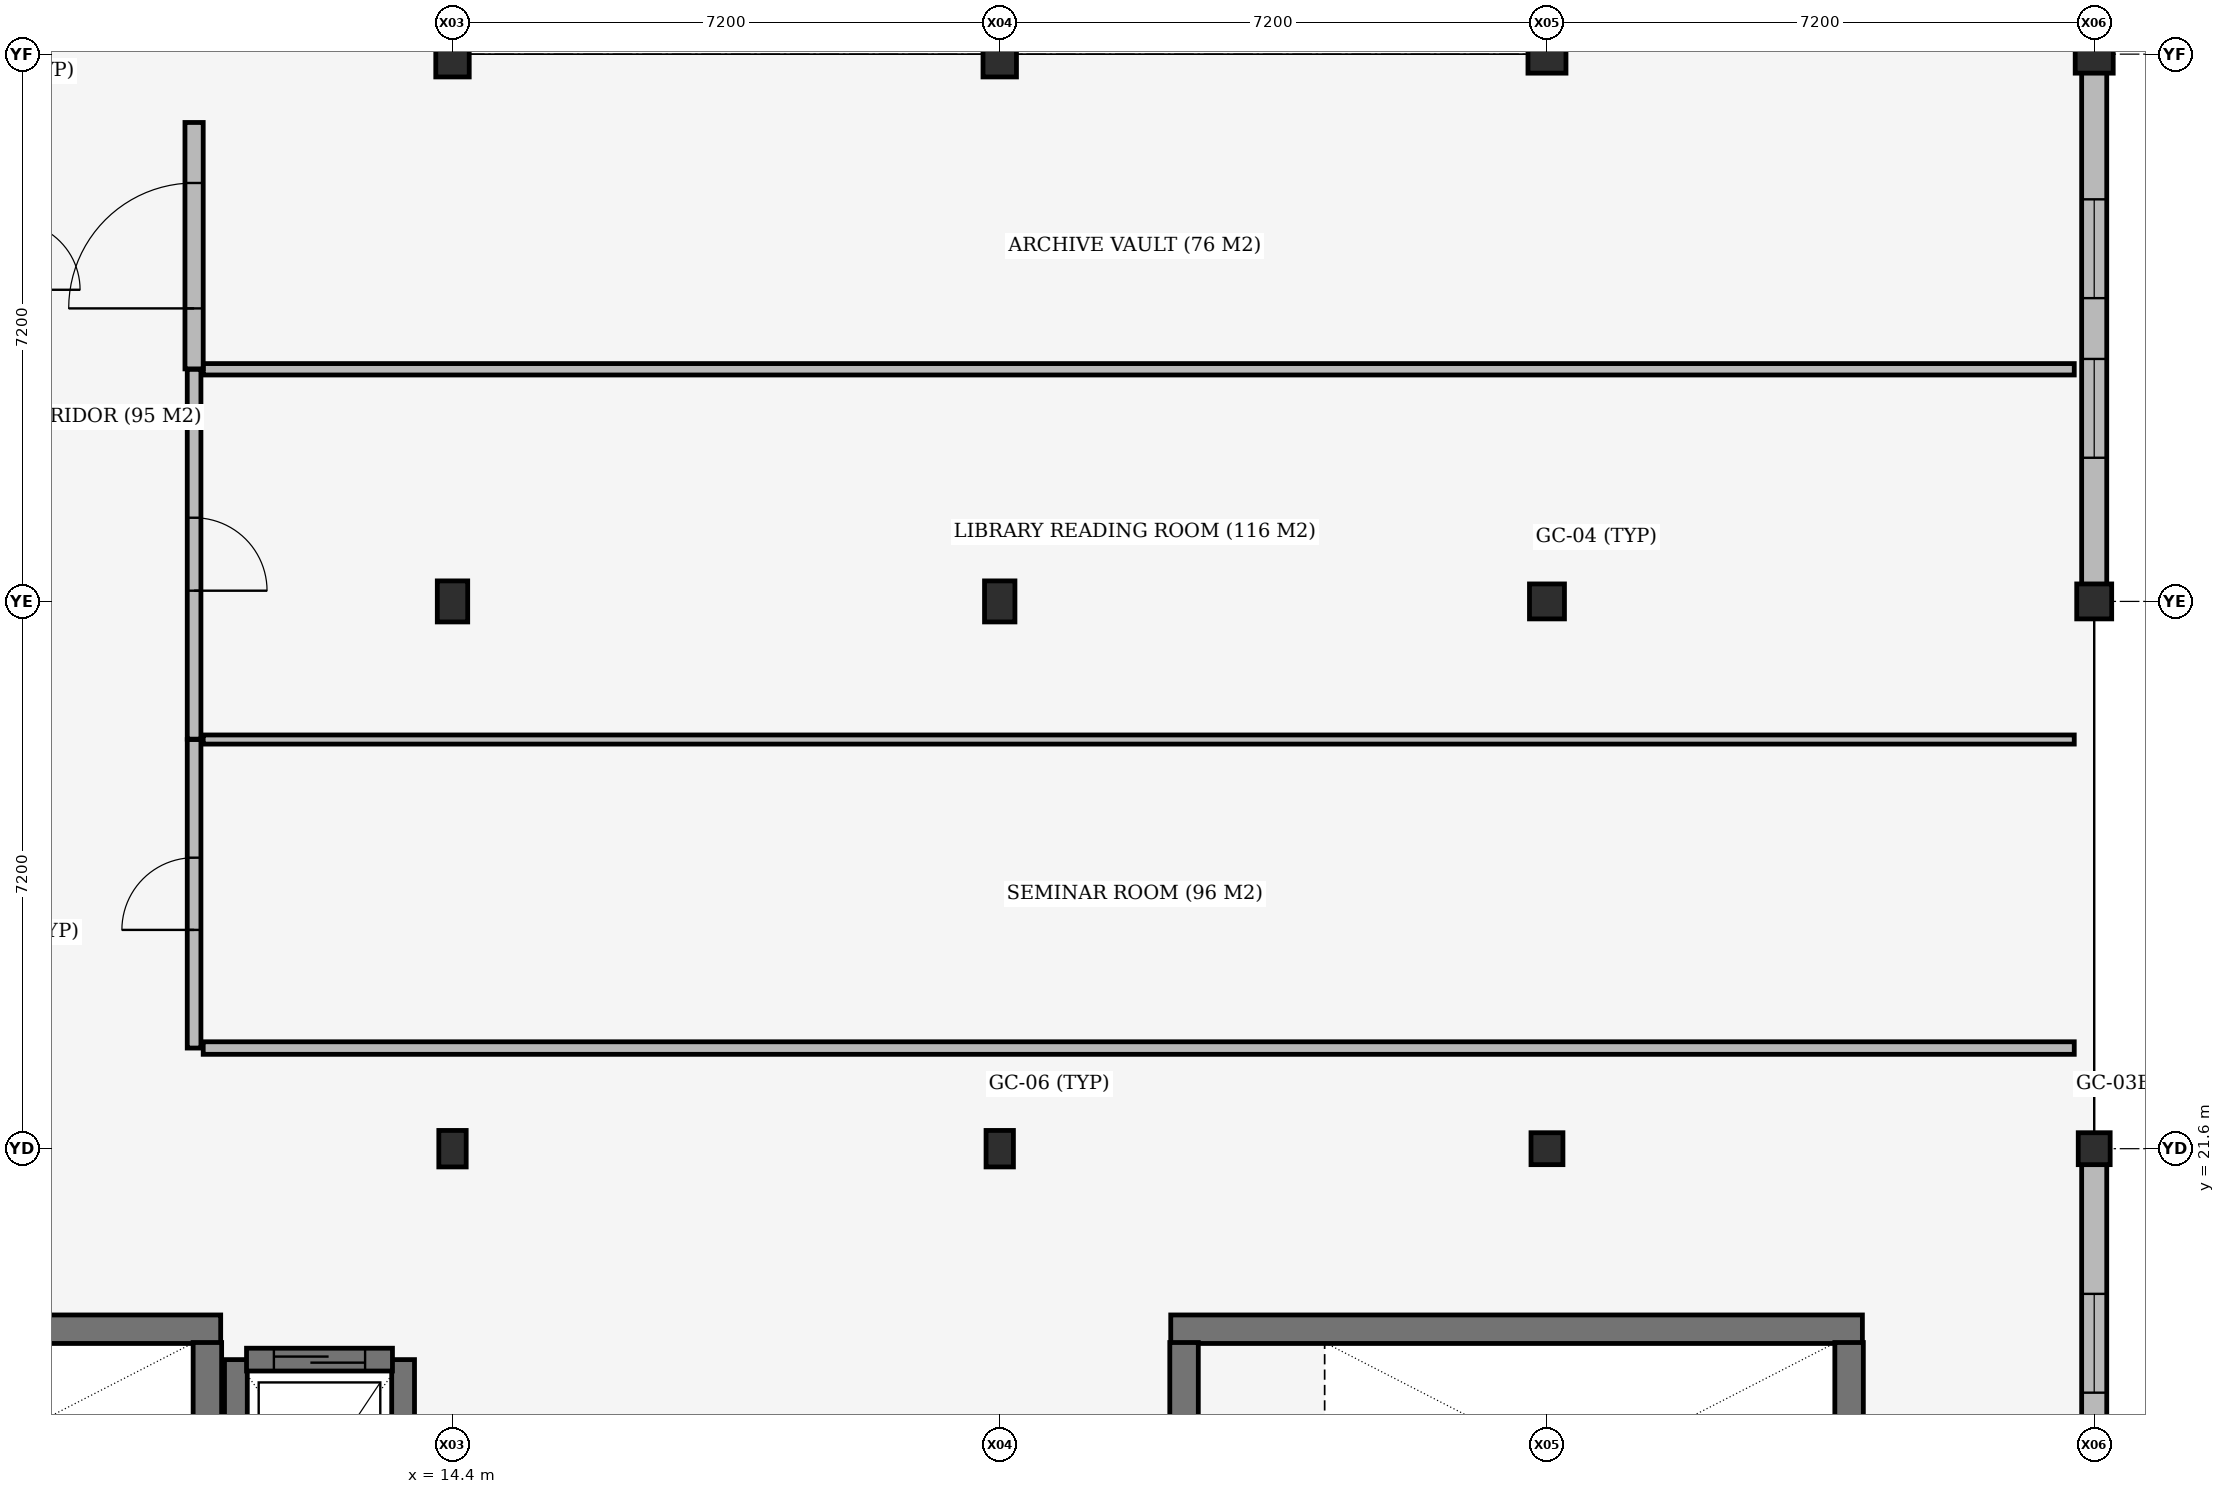
"""IFC4 building model, lengths in metres.
Left out: names, types, materials, properties, quantities, classifications, styles, units other than length and angle.
Written with IfcOpenShell. Run it as: python <this file> out.ifc"""

import sys

from ifc_helpers import new_model, si_unit, direction, frame, frame_2d, origin, origin_2d, place, context, subcontext, project, spatial, rectangle, extrude, element, fill, save


model = new_model("IFC4")
c1 = context("Model", 3, precision=1e-05, world=origin(), true_north=direction((0.0, 1.0)))
c2 = subcontext(c1, "Body", "Model", "MODEL_VIEW")
j1 = project(units=[si_unit("LENGTHUNIT", "METRE"), si_unit("PLANEANGLEUNIT", "RADIAN")], contexts=[c1])
p1 = place(None, origin())
s1 = spatial("IfcSite", under=j1, at=p1, CompositionType="ELEMENT")
p2 = place(p1, origin())
s2 = spatial("IfcBuilding", under=s1, at=p2, CompositionType="ELEMENT")
p3 = place(p2, frame((0.0, 0.0, 22.2)))
s3 = spatial("IfcBuildingStorey", under=s2, at=p3, CompositionType="ELEMENT", Elevation=22.2)
p4 = place(p3, frame((14.4, 21.6, 0.0), z_axis=(0.0, 0.0, 1.0), x_axis=(1.0, 0.0, 0.0)))
e1 = element("IfcColumn", 1, at=p4, inside=s3, PredefinedType="COLUMN", context=c2, shape_type="SweptSolid", body=[
    extrude(rectangle(XDim=0.36, YDim=0.48, at=origin_2d()), origin(), (0.0, 0.0, 1.0), 3.96),
])
p5 = place(p3, frame((14.4, 28.8, 0.0), z_axis=(0.0, 0.0, 1.0), x_axis=(1.0, 0.0, 0.0)))
e2 = element("IfcColumn", 2, at=p5, inside=s3, PredefinedType="COLUMN", context=c2, shape_type="SweptSolid", body=[
    extrude(rectangle(XDim=0.4, YDim=0.54, at=origin_2d()), origin(), (0.0, 0.0, 1.0), 3.96),
])
p6 = place(p3, frame((14.4, 36.0, 0.0), z_axis=(0.0, 0.0, 1.0), x_axis=(1.0, 0.0, 0.0)))
e3 = element("IfcColumn", 3, at=p6, inside=s3, PredefinedType="COLUMN", context=c2, shape_type="SweptSolid", body=[
    extrude(rectangle(XDim=0.44, YDim=0.6, at=origin_2d()), origin(), (0.0, 0.0, 1.0), 3.96),
])
p7 = place(p3, frame((21.6, 21.6, 0.0), z_axis=(0.0, 0.0, 1.0), x_axis=(1.0, 0.0, 0.0)))
e4 = element("IfcColumn", 4, at=p7, inside=s3, PredefinedType="COLUMN", context=c2, shape_type="SweptSolid", body=[
    extrude(rectangle(XDim=0.36, YDim=0.48, at=origin_2d()), origin(), (0.0, 0.0, 1.0), 3.96),
])
p8 = place(p3, frame((21.6, 28.8, 0.0), z_axis=(0.0, 0.0, 1.0), x_axis=(1.0, 0.0, 0.0)))
e5 = element("IfcColumn", 5, at=p8, inside=s3, PredefinedType="COLUMN", context=c2, shape_type="SweptSolid", body=[
    extrude(rectangle(XDim=0.4, YDim=0.54, at=origin_2d()), origin(), (0.0, 0.0, 1.0), 3.96),
])
p9 = place(p3, frame((21.6, 36.0, 0.0), z_axis=(0.0, 0.0, 1.0), x_axis=(1.0, 0.0, 0.0)))
e6 = element("IfcColumn", 6, at=p9, inside=s3, PredefinedType="COLUMN", context=c2, shape_type="SweptSolid", body=[
    extrude(rectangle(XDim=0.44, YDim=0.6, at=origin_2d()), origin(), (0.0, 0.0, 1.0), 3.96),
])
p10 = place(p3, frame((28.8, 21.6, 0.0), z_axis=(0.0, 0.0, 1.0), x_axis=(1.0, 0.0, 0.0)))
e7 = element("IfcColumn", 7, at=p10, inside=s3, PredefinedType="COLUMN", context=c2, shape_type="SweptSolid", body=[
    extrude(rectangle(XDim=0.42, YDim=0.42, at=origin_2d()), origin(), (0.0, 0.0, 1.0), 3.96),
])
p11 = place(p3, frame((28.8, 28.8, 0.0), z_axis=(0.0, 0.0, 1.0), x_axis=(1.0, 0.0, 0.0)))
e8 = element("IfcColumn", 8, at=p11, inside=s3, PredefinedType="COLUMN", context=c2, shape_type="SweptSolid", body=[
    extrude(rectangle(XDim=0.46, YDim=0.46, at=origin_2d()), origin(), (0.0, 0.0, 1.0), 3.96),
])
p12 = place(p3, frame((28.8, 36.0, 0.0), z_axis=(0.0, 0.0, 1.0), x_axis=(1.0, 0.0, 0.0)))
e9 = element("IfcColumn", 9, at=p12, inside=s3, PredefinedType="COLUMN", context=c2, shape_type="SweptSolid", body=[
    extrude(rectangle(XDim=0.5, YDim=0.5, at=origin_2d()), origin(), (0.0, 0.0, 1.0), 3.96),
])
p13 = place(p3, frame((36.0, 21.6, 0.0), z_axis=(0.0, 0.0, 1.0), x_axis=(1.0, 0.0, 0.0)))
e10 = element("IfcColumn", 10, at=p13, inside=s3, PredefinedType="COLUMN", context=c2, shape_type="SweptSolid", body=[
    extrude(rectangle(XDim=0.42, YDim=0.42, at=origin_2d()), origin(), (0.0, 0.0, 1.0), 3.96),
])
p14 = place(p3, frame((36.0, 28.8, 0.0), z_axis=(0.0, 0.0, 1.0), x_axis=(1.0, 0.0, 0.0)))
e11 = element("IfcColumn", 11, at=p14, inside=s3, PredefinedType="COLUMN", context=c2, shape_type="SweptSolid", body=[
    extrude(rectangle(XDim=0.46, YDim=0.46, at=origin_2d()), origin(), (0.0, 0.0, 1.0), 3.96),
])
p15 = place(p3, frame((36.0, 36.0, 0.0), z_axis=(0.0, 0.0, 1.0), x_axis=(1.0, 0.0, 0.0)))
e12 = element("IfcColumn", 12, at=p15, inside=s3, PredefinedType="COLUMN", context=c2, shape_type="SweptSolid", body=[
    extrude(rectangle(XDim=0.5, YDim=0.5, at=origin_2d()), origin(), (0.0, 0.0, 1.0), 3.96),
])
p16 = place(p3, frame((11.35, 19.225, 0.0), z_axis=(0.0, 0.0, 1.0), x_axis=(-1.0, 0.0, 0.0)))
e13 = element("IfcWall", 13, at=p16, inside=s3, PredefinedType="SHEAR", context=c2, shape_type="SweptSolid", body=[
    extrude(rectangle(XDim=9.1, YDim=0.375, at=frame_2d((4.55, 0.0))), origin(), (0.0, 0.0, 1.0), 3.96),
])
p17 = place(p3, frame((11.175, 15.6, 0.0), z_axis=(0.0, 0.0, 1.0), x_axis=(0.0, 1.0, 0.0)))
e14 = element("IfcWall", 14, at=p17, inside=s3, PredefinedType="SHEAR", context=c2, shape_type="SweptSolid", body=[
    extrude(rectangle(XDim=3.45, YDim=0.375, at=frame_2d((1.725, 0.0))), origin(), (0.0, 0.0, 1.0), 3.96),
])
p18 = place(p3, frame((32.95, 19.225, 0.0), z_axis=(0.0, 0.0, 1.0), x_axis=(-1.0, 0.0, 0.0)))
e15 = element("IfcWall", 15, at=p18, inside=s3, PredefinedType="SHEAR", context=c2, shape_type="SweptSolid", body=[
    extrude(rectangle(XDim=9.1, YDim=0.375, at=frame_2d((4.55, 0.0))), origin(), (0.0, 0.0, 1.0), 3.96),
])
p19 = place(p3, frame((32.775, 15.6, 0.0), z_axis=(0.0, 0.0, 1.0), x_axis=(0.0, 1.0, 0.0)))
e16 = element("IfcWall", 16, at=p19, inside=s3, PredefinedType="SHEAR", context=c2, shape_type="SweptSolid", body=[
    extrude(rectangle(XDim=3.45, YDim=0.375, at=frame_2d((1.725, 0.0))), origin(), (0.0, 0.0, 1.0), 3.96),
])
for number, where, z_axis, x_axis in (
    (17, (11.55, 18.825, 0.0), (0.0, 0.0, 1.0), (0.0, -1.0, 0.0)),
    (18, (13.75, 15.825, 0.0), (0.0, 0.0, 1.0), (0.0, 1.0, 0.0)),
):
    element("IfcWall", number, at=place(p3, frame(where, z_axis=z_axis, x_axis=x_axis)), inside=s3, PredefinedType="SHEAR", context=c2, shape_type="SweptSolid", body=[
        extrude(rectangle(XDim=3.0, YDim=0.3, at=frame_2d((1.5, 0.0))), origin(), (0.0, 0.0, 1.0), 4.86),
    ])
p20 = place(p3, frame((36.0, 21.398, 0.0), z_axis=(0.0, 0.0, 1.0), x_axis=(0.0, -1.0, 0.0)))
e19 = element("IfcWall", 19, at=p20, inside=s3, PredefinedType="STANDARD", context=c2, shape_type="SweptSolid", body=[
    extrude(rectangle(XDim=6.816, YDim=0.33, at=frame_2d((3.408, 0.0))), origin(), (0.0, 0.0, 1.0), 3.96),
])
p21 = place(p20, frame((1.708, 0.0, 0.95)))
e20 = element("IfcOpeningElement", 20, at=p21, cuts=e19, PredefinedType="OPENING", context=c2, shape_type="SweptSolid", body=[
    extrude(rectangle(XDim=1.3, YDim=1.8, at=frame_2d((0.65, 0.9))), frame((0.0, 0.175, 0.0), z_axis=(0.0, -1.0, 0.0), x_axis=(1.0, 0.0, 0.0)), (0.0, 0.0, 1.0), 0.35),
])
p22 = place(p20, frame((3.808, 0.0, 0.95)))
e21 = element("IfcOpeningElement", 21, at=p22, cuts=e19, PredefinedType="OPENING", context=c2, shape_type="SweptSolid", body=[
    extrude(rectangle(XDim=1.3, YDim=1.8, at=frame_2d((0.65, 0.9))), frame((0.0, 0.175, 0.0), z_axis=(0.0, -1.0, 0.0), x_axis=(1.0, 0.0, 0.0)), (0.0, 0.0, 1.0), 0.35),
])
p23 = place(p3, frame((36.0, 35.758, 0.0), z_axis=(0.0, 0.0, 1.0), x_axis=(0.0, -1.0, 0.0)))
e22 = element("IfcWall", 22, at=p23, inside=s3, PredefinedType="STANDARD", context=c2, shape_type="SweptSolid", body=[
    extrude(rectangle(XDim=6.736, YDim=0.33, at=frame_2d((3.368, 0.0))), origin(), (0.0, 0.0, 1.0), 3.96),
])
p24 = place(p23, frame((1.668, 0.0, 0.95)))
e23 = element("IfcOpeningElement", 23, at=p24, cuts=e22, PredefinedType="OPENING", context=c2, shape_type="SweptSolid", body=[
    extrude(rectangle(XDim=1.3, YDim=1.8, at=frame_2d((0.65, 0.9))), frame((0.0, 0.175, 0.0), z_axis=(0.0, -1.0, 0.0), x_axis=(1.0, 0.0, 0.0)), (0.0, 0.0, 1.0), 0.35),
])
p25 = place(p23, frame((3.768, 0.0, 0.95)))
e24 = element("IfcOpeningElement", 24, at=p25, cuts=e22, PredefinedType="OPENING", context=c2, shape_type="SweptSolid", body=[
    extrude(rectangle(XDim=1.3, YDim=1.8, at=frame_2d((0.65, 0.9))), frame((0.0, 0.175, 0.0), z_axis=(0.0, -1.0, 0.0), x_axis=(1.0, 0.0, 0.0)), (0.0, 0.0, 1.0), 0.35),
])
p26 = place(p3, frame((35.87, 7.33, 4.2), z_axis=(0.0, 0.0, 1.0), x_axis=(0.0, 1.0, 0.0)))
e25 = element("IfcWall", 25, at=p26, inside=s3, PredefinedType="PARAPET", context=c2, shape_type="SweptSolid", body=[
    extrude(rectangle(XDim=53.74, YDim=0.245, at=frame_2d((26.87, 0.0))), origin(), (0.0, 0.0, 1.0), 0.95),
])
p27 = place(p3, frame((24.025, 19.05, 0.0), z_axis=(0.0, 0.0, 1.0), x_axis=(0.0, -1.0, 0.0)))
e26 = element("IfcWall", 26, at=p27, inside=s3, PredefinedType="SHEAR", context=c2, shape_type="SweptSolid", body=[
    extrude(rectangle(XDim=3.45, YDim=0.375, at=frame_2d((1.725, 0.0))), origin(), (0.0, 0.0, 1.0), 3.96),
])
p28 = place(p27, frame((1.035, 0.0, 0.0)))
e27 = element("IfcOpeningElement", 27, at=p28, cuts=e26, PredefinedType="OPENING", context=c2, shape_type="SweptSolid", body=[
    extrude(rectangle(XDim=1.38, YDim=2.2, at=frame_2d((0.69, 1.1))), frame((0.0, 0.198, 0.0), z_axis=(0.0, -1.0, 0.0), x_axis=(1.0, 0.0, 0.0)), (0.0, 0.0, 1.0), 0.395),
])
p29 = place(p3, frame((11.69, 18.825, 0.0), z_axis=(0.0, 0.0, 1.0), x_axis=(1.0, 0.0, 0.0)))
e28 = element("IfcWall", 28, at=p29, inside=s3, PredefinedType="SHEAR", context=c2, shape_type="SweptSolid", body=[
    extrude(rectangle(XDim=1.92, YDim=0.3, at=frame_2d((0.96, 0.0))), origin(), (0.0, 0.0, 1.0), 5.1),
])
p30 = place(p29, frame((0.36, 0.0, 0.0)))
e29 = element("IfcOpeningElement", 29, at=p30, cuts=e28, PredefinedType="OPENING", context=c2, shape_type="SweptSolid", body=[
    extrude(rectangle(XDim=1.2, YDim=2.1, at=frame_2d((0.6, 1.05))), frame((0.0, 0.16, 0.0), z_axis=(0.0, -1.0, 0.0), x_axis=(1.0, 0.0, 0.0)), (0.0, 0.0, 1.0), 0.32),
])
p31 = place(p3, frame((11.0, 22.924, 0.0), z_axis=(0.0, 0.0, 1.0), x_axis=(0.0, 1.0, 0.0)))
e30 = element("IfcWall", 30, at=p31, inside=s3, PredefinedType="PARTITIONING", context=c2, shape_type="SweptSolid", body=[
    extrude(rectangle(XDim=4.059, YDim=0.18, at=frame_2d((2.029, 0.0))), origin(), (0.0, 0.0, 1.0), 3.96),
])
p32 = place(p31, frame((1.554, 0.0, 0.0)))
e31 = element("IfcOpeningElement", 31, at=p32, cuts=e30, PredefinedType="OPENING", context=c2, shape_type="SweptSolid", body=[
    extrude(rectangle(XDim=0.95, YDim=2.15, at=frame_2d((0.475, 1.075))), frame((0.0, 0.1, 0.0), z_axis=(0.0, -1.0, 0.0), x_axis=(1.0, 0.0, 0.0)), (0.0, 0.0, 1.0), 0.2),
])
p33 = place(p3, frame((11.12, 22.924, 0.0), z_axis=(0.0, 0.0, 1.0), x_axis=(1.0, 0.0, 0.0)))
e32 = element("IfcWall", 32, at=p33, inside=s3, PredefinedType="PARTITIONING", context=c2, shape_type="SweptSolid", body=[
    extrude(rectangle(XDim=24.617, YDim=0.165, at=frame_2d((12.309, 0.0))), origin(), (0.0, 0.0, 1.0), 3.96),
])
p34 = place(p3, frame((11.12, 26.983, 0.0), z_axis=(0.0, 0.0, 1.0), x_axis=(1.0, 0.0, 0.0)))
e33 = element("IfcWall", 33, at=p34, inside=s3, PredefinedType="PARTITIONING", context=c2, shape_type="SweptSolid", body=[
    extrude(rectangle(XDim=24.617, YDim=0.12, at=frame_2d((12.309, 0.0))), origin(), (0.0, 0.0, 1.0), 3.96),
])
p35 = place(p3, frame((11.0, 26.988, 0.0), z_axis=(0.0, 0.0, 1.0), x_axis=(0.0, 1.0, 0.0)))
e34 = element("IfcWall", 34, at=p35, inside=s3, PredefinedType="PARTITIONING", context=c2, shape_type="SweptSolid", body=[
    extrude(rectangle(XDim=4.866, YDim=0.18, at=frame_2d((2.433, 0.0))), origin(), (0.0, 0.0, 1.0), 3.96),
])
p36 = place(p35, frame((1.953, 0.0, 0.0)))
e35 = element("IfcOpeningElement", 35, at=p36, cuts=e34, PredefinedType="OPENING", context=c2, shape_type="SweptSolid", body=[
    extrude(rectangle(XDim=0.96, YDim=2.15, at=frame_2d((0.48, 1.075))), frame((0.0, 0.1, 0.0), z_axis=(0.0, -1.0, 0.0), x_axis=(1.0, 0.0, 0.0)), (0.0, 0.0, 1.0), 0.2),
])
p37 = place(p3, frame((11.12, 31.854, 0.0), z_axis=(0.0, 0.0, 1.0), x_axis=(1.0, 0.0, 0.0)))
e36 = element("IfcWall", 36, at=p37, inside=s3, PredefinedType="PARTITIONING", context=c2, shape_type="SweptSolid", body=[
    extrude(rectangle(XDim=24.617, YDim=0.15, at=frame_2d((12.309, 0.0))), origin(), (0.0, 0.0, 1.0), 3.96),
])
p38 = place(p3, frame((11.0, 31.859, 0.0), z_axis=(0.0, 0.0, 1.0), x_axis=(0.0, 1.0, 0.0)))
e37 = element("IfcWall", 37, at=p38, inside=s3, PredefinedType="STANDARD", context=c2, shape_type="SweptSolid", body=[
    extrude(rectangle(XDim=3.242, YDim=0.24, at=frame_2d((1.621, 0.0))), origin(), (0.0, 0.0, 1.0), 3.96),
])
p39 = place(p38, frame((0.796, 0.0, 0.0)))
e38 = element("IfcOpeningElement", 38, at=p39, cuts=e37, PredefinedType="OPENING", context=c2, shape_type="SweptSolid", body=[
    extrude(rectangle(XDim=1.65, YDim=2.25, at=frame_2d((0.825, 1.125))), frame((0.0, 0.13, 0.0), z_axis=(0.0, -1.0, 0.0), x_axis=(1.0, 0.0, 0.0)), (0.0, 0.0, 1.0), 0.26),
])
p40 = place(p21, origin())
e39 = element("IfcWindow", 39, at=p40, inside=s3, PartitioningType="DOUBLE_PANEL_VERTICAL", PredefinedType="WINDOW", context=c2, shape_type="SweptSolid", body=[
    extrude(rectangle(XDim=1.3, YDim=1.8, at=frame_2d((0.65, 0.9))), frame((0.0, 0.03, 0.0), z_axis=(0.0, -1.0, 0.0), x_axis=(1.0, 0.0, 0.0)), (0.0, 0.0, 1.0), 0.06),
])
fill(e20, e39)
p41 = place(p24, origin())
e40 = element("IfcWindow", 40, at=p41, inside=s3, PartitioningType="DOUBLE_PANEL_VERTICAL", PredefinedType="WINDOW", context=c2, shape_type="SweptSolid", body=[
    extrude(rectangle(XDim=1.3, YDim=1.8, at=frame_2d((0.65, 0.9))), frame((0.0, 0.03, 0.0), z_axis=(0.0, -1.0, 0.0), x_axis=(1.0, 0.0, 0.0)), (0.0, 0.0, 1.0), 0.06),
])
fill(e23, e40)
p42 = place(p25, origin())
e41 = element("IfcWindow", 41, at=p42, inside=s3, PartitioningType="DOUBLE_PANEL_VERTICAL", PredefinedType="WINDOW", context=c2, shape_type="SweptSolid", body=[
    extrude(rectangle(XDim=1.3, YDim=1.8, at=frame_2d((0.65, 0.9))), frame((0.0, 0.03, 0.0), z_axis=(0.0, -1.0, 0.0), x_axis=(1.0, 0.0, 0.0)), (0.0, 0.0, 1.0), 0.06),
])
fill(e24, e41)
p43 = place(p30, origin())
e42 = element("IfcDoor", 42, at=p43, inside=s3, OperationType="SLIDING_TO_LEFT", PredefinedType="DOOR", context=c2, shape_type="SweptSolid", body=[
    extrude(rectangle(XDim=1.2, YDim=2.1, at=frame_2d((0.6, 1.05))), frame((0.0, 0.025, 0.0), z_axis=(0.0, -1.0, 0.0), x_axis=(1.0, 0.0, 0.0)), (0.0, 0.0, 1.0), 0.05),
])
fill(e29, e42)
p44 = place(p32, origin())
e43 = element("IfcDoor", 43, at=p44, inside=s3, OperationType="SINGLE_SWING_LEFT", PredefinedType="DOOR", context=c2, shape_type="SweptSolid", body=[
    extrude(rectangle(XDim=0.95, YDim=2.15, at=frame_2d((0.475, 1.075))), frame((0.0, 0.025, 0.0), z_axis=(0.0, -1.0, 0.0), x_axis=(1.0, 0.0, 0.0)), (0.0, 0.0, 1.0), 0.05),
])
fill(e31, e43)
p45 = place(p36, origin())
e44 = element("IfcDoor", 44, at=p45, inside=s3, OperationType="SINGLE_SWING_RIGHT", PredefinedType="DOOR", context=c2, shape_type="SweptSolid", body=[
    extrude(rectangle(XDim=0.96, YDim=2.15, at=frame_2d((0.48, 1.075))), frame((0.0, 0.025, 0.0), z_axis=(0.0, -1.0, 0.0), x_axis=(1.0, 0.0, 0.0)), (0.0, 0.0, 1.0), 0.05),
])
fill(e35, e44)
p46 = place(p39, origin())
e45 = element("IfcDoor", 45, at=p46, inside=s3, OperationType="DOUBLE_DOOR_SINGLE_SWING", PredefinedType="DOOR", context=c2, shape_type="SweptSolid", body=[
    extrude(rectangle(XDim=1.65, YDim=2.25, at=frame_2d((0.825, 1.125))), frame((0.0, 0.025, 0.0), z_axis=(0.0, -1.0, 0.0), x_axis=(1.0, 0.0, 0.0)), (0.0, 0.0, 1.0), 0.05),
])
fill(e38, e45)
save(model, sys.argv[1])
